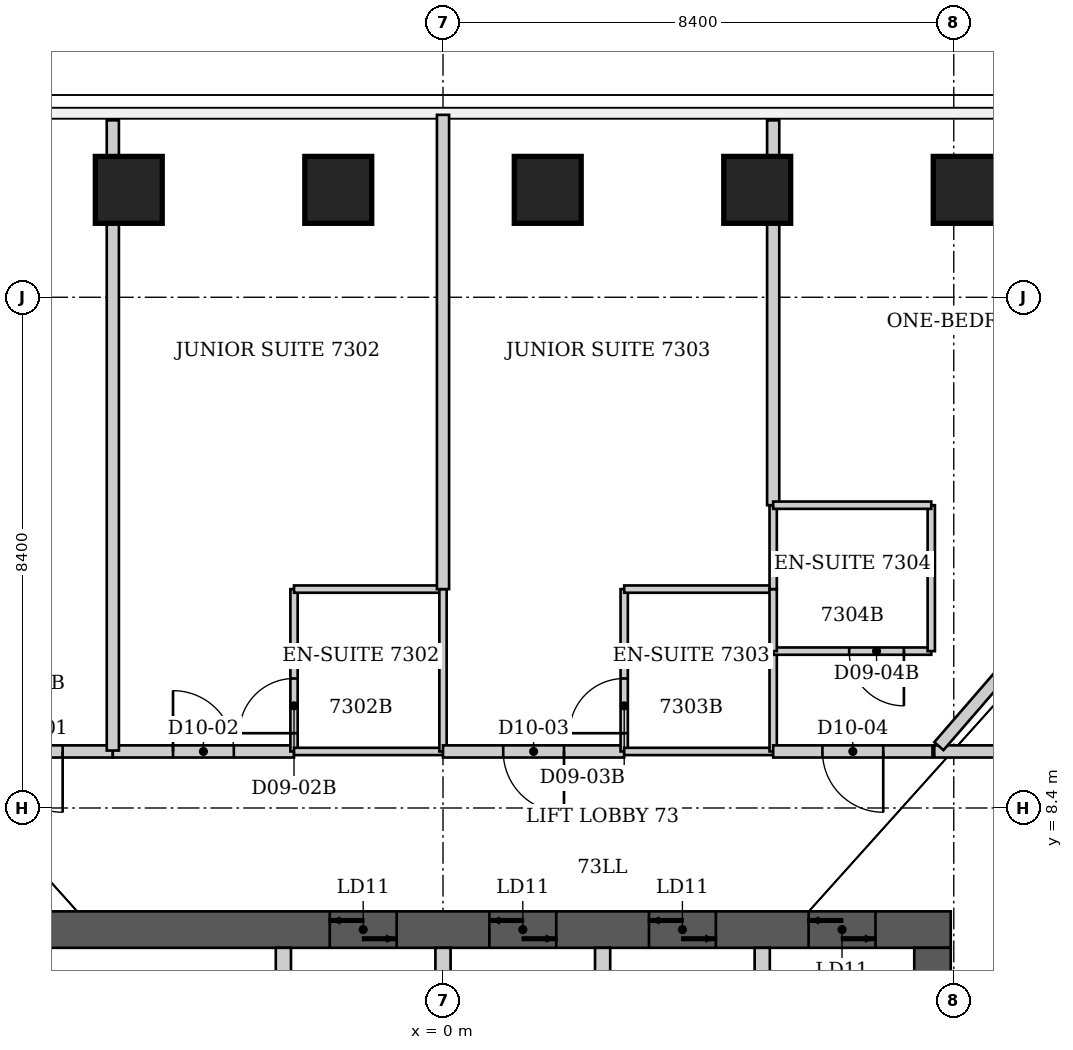
"""IFC4 building model, lengths in metres.
Left out: names, types, materials, properties, quantities, classifications, styles, units other than length and angle.
Written with IfcOpenShell. Run it as: python <this file> out.ifc"""

import sys

from ifc_helpers import new_model, si_unit, direction, frame, frame_2d, origin, origin_2d, place, context, subcontext, project, spatial, rectangle, extrude, element, fill, save


model = new_model("IFC4")
c1 = context("Model", 3, precision=1e-05, world=origin(), true_north=direction((0.0, 1.0)))
c2 = subcontext(c1, "Body", "Model", "MODEL_VIEW")
j1 = project(units=[si_unit("LENGTHUNIT", "METRE"), si_unit("PLANEANGLEUNIT", "RADIAN")], contexts=[c1])
p1 = place(None, origin())
s1 = spatial("IfcSite", under=j1, at=p1, CompositionType="ELEMENT")
p2 = place(p1, origin())
s2 = spatial("IfcBuilding", under=s1, at=p2, CompositionType="ELEMENT")
p3 = place(p2, frame((0.0, 0.0, 291.2)))
s3 = spatial("IfcBuildingStorey", under=s2, at=p3, CompositionType="ELEMENT", Elevation=291.2)
for number, where, z_axis, x_axis in (
    (1, (-5.167, 18.566, 0.0), (0.0, 0.0, 1.0), (0.0, 1.0, 0.0)),
    (2, (-1.722, 18.566, 0.0), (0.0, 0.0, 1.0), (0.0, 1.0, 0.0)),
    (3, (1.722, 18.566, 0.0), (0.0, 0.0, 1.0), (0.0, 1.0, 0.0)),
    (4, (5.167, 18.566, 0.0), (0.0, 0.0, 1.0), (0.0, 1.0, 0.0)),
    (5, (8.613, 18.566, 0.0), (0.0, 0.0, 1.0), (0.0, 1.0, 0.0)),
):
    element("IfcColumn", number, at=place(p3, frame(where, z_axis=z_axis, x_axis=x_axis)), inside=s3, PredefinedType="COLUMN", context=c2, shape_type="SweptSolid", body=[
        extrude(rectangle(XDim=1.1, YDim=1.1, at=origin_2d()), origin(), (0.0, 0.0, 1.0), 3.8),
    ])
p4 = place(p3, frame((-8.35, 6.4, 0.0), z_axis=(0.0, 0.0, 1.0), x_axis=(1.0, 0.0, 0.0)))
e6 = element("IfcWall", 6, at=p4, inside=s3, PredefinedType="SHEAR", context=c2, shape_type="SweptSolid", body=[
    extrude(rectangle(XDim=16.7, YDim=0.6, at=frame_2d((8.35, 0.0))), origin(), (0.0, 0.0, 1.0), 3.8),
])
p5 = place(p4, frame((6.488, 0.0, 0.0)))
e7 = element("IfcOpeningElement", 7, at=p5, cuts=e6, PredefinedType="OPENING", context=c2, shape_type="SweptSolid", body=[
    extrude(rectangle(XDim=1.1, YDim=2.1, at=frame_2d((0.55, 1.05))), frame((0.0, 0.3, 0.0), z_axis=(0.0, -1.0, 0.0), x_axis=(1.0, 0.0, 0.0)), (0.0, 0.0, 1.0), 0.6),
])
p6 = place(p4, frame((9.113, 0.0, 0.0)))
e8 = element("IfcOpeningElement", 8, at=p6, cuts=e6, PredefinedType="OPENING", context=c2, shape_type="SweptSolid", body=[
    extrude(rectangle(XDim=1.1, YDim=2.1, at=frame_2d((0.55, 1.05))), frame((0.0, 0.3, 0.0), z_axis=(0.0, -1.0, 0.0), x_axis=(1.0, 0.0, 0.0)), (0.0, 0.0, 1.0), 0.6),
])
p7 = place(p4, frame((11.738, 0.0, 0.0)))
e9 = element("IfcOpeningElement", 9, at=p7, cuts=e6, PredefinedType="OPENING", context=c2, shape_type="SweptSolid", body=[
    extrude(rectangle(XDim=1.1, YDim=2.1, at=frame_2d((0.55, 1.05))), frame((0.0, 0.3, 0.0), z_axis=(0.0, -1.0, 0.0), x_axis=(1.0, 0.0, 0.0)), (0.0, 0.0, 1.0), 0.6),
])
p8 = place(p4, frame((14.363, 0.0, 0.0)))
e10 = element("IfcOpeningElement", 10, at=p8, cuts=e6, PredefinedType="OPENING", context=c2, shape_type="SweptSolid", body=[
    extrude(rectangle(XDim=1.1, YDim=2.1, at=frame_2d((0.55, 1.05))), frame((0.0, 0.3, 0.0), z_axis=(0.0, -1.0, 0.0), x_axis=(1.0, 0.0, 0.0)), (0.0, 0.0, 1.0), 0.6),
])
p9 = place(p3, frame((8.05, -6.1, 0.0), z_axis=(0.0, 0.0, 1.0), x_axis=(0.0, 1.0, 0.0)))
e11 = element("IfcWall", 11, at=p9, inside=s3, PredefinedType="SHEAR", context=c2, shape_type="SweptSolid", body=[
    extrude(rectangle(XDim=12.2, YDim=0.6, at=frame_2d((6.1, 0.0))), origin(), (0.0, 0.0, 1.0), 3.8),
])
p10 = place(p9, frame((7.6, 0.0, 0.0)))
e12 = element("IfcOpeningElement", 12, at=p10, cuts=e11, PredefinedType="OPENING", context=c2, shape_type="SweptSolid", body=[
    extrude(rectangle(XDim=1.2, YDim=2.2, at=frame_2d((0.6, 1.1))), frame((0.0, 0.3, 0.0), z_axis=(0.0, -1.0, 0.0), x_axis=(1.0, 0.0, 0.0)), (0.0, 0.0, 1.0), 0.6),
])
for number, where, z_axis, x_axis in (
    (13, (-2.625, 3.35, 0.0), (0.0, 0.0, 1.0), (0.0, 1.0, 0.0)),
    (14, (0.0, 3.35, 0.0), (0.0, 0.0, 1.0), (0.0, 1.0, 0.0)),
    (15, (2.625, 3.35, 0.0), (0.0, 0.0, 1.0), (0.0, 1.0, 0.0)),
    (16, (5.25, 3.35, 0.0), (0.0, 0.0, 1.0), (0.0, 1.0, 0.0)),
):
    element("IfcWall", number, at=place(p3, frame(where, z_axis=z_axis, x_axis=x_axis)), inside=s3, PredefinedType="PARTITIONING", context=c2, shape_type="SweptSolid", body=[
        extrude(rectangle(XDim=2.75, YDim=0.25, at=frame_2d((1.375, 0.0))), origin(), (0.0, 0.0, 1.0), 3.8),
    ])
p11 = place(p3, frame((-5.43, 9.33, 0.0), z_axis=(0.0, 0.0, 1.0), x_axis=(-1.0, 0.0, 0.0)))
e17 = element("IfcWall", 17, at=p11, inside=s3, PredefinedType="PARTITIONING", context=c2, shape_type="SweptSolid", body=[
    extrude(rectangle(XDim=2.65, YDim=0.2, at=frame_2d((1.325, 0.0))), origin(), (0.0, 0.0, 1.0), 3.64),
])
p12 = place(p11, frame((0.825, 0.0, 0.0)))
e18 = element("IfcOpeningElement", 18, at=p12, cuts=e17, PredefinedType="OPENING", context=c2, shape_type="SweptSolid", body=[
    extrude(rectangle(XDim=1.0, YDim=2.13, at=frame_2d((0.5, 1.065))), frame((0.0, 0.1, 0.0), z_axis=(0.0, -1.0, 0.0), x_axis=(1.0, 0.0, 0.0)), (0.0, 0.0, 1.0), 0.2),
])
p13 = place(p3, frame((-5.43, 9.33, 0.0), z_axis=(0.0, 0.0, 1.0), x_axis=(1.0, 0.0, 0.0)))
e19 = element("IfcWall", 19, at=p13, inside=s3, PredefinedType="PARTITIONING", context=c2, shape_type="SweptSolid", body=[
    extrude(rectangle(XDim=2.98, YDim=0.2, at=frame_2d((1.49, 0.0))), origin(), (0.0, 0.0, 1.0), 3.64),
])
p14 = place(p13, frame((0.99, 0.0, 0.0)))
e20 = element("IfcOpeningElement", 20, at=p14, cuts=e19, PredefinedType="OPENING", context=c2, shape_type="SweptSolid", body=[
    extrude(rectangle(XDim=1.0, YDim=2.13, at=frame_2d((0.5, 1.065))), frame((0.0, 0.1, 0.0), z_axis=(0.0, -1.0, 0.0), x_axis=(1.0, 0.0, 0.0)), (0.0, 0.0, 1.0), 0.2),
])
p15 = place(p3, frame((-5.43, 19.71, 0.0), z_axis=(0.0, 0.0, 1.0), x_axis=(0.0, -1.0, 0.0)))
e21 = element("IfcWall", 21, at=p15, inside=s3, PredefinedType="PARTITIONING", context=c2, shape_type="SweptSolid", body=[
    extrude(rectangle(XDim=10.365, YDim=0.2, at=frame_2d((5.183, 0.0))), origin(), (0.0, 0.0, 1.0), 3.64),
])
p16 = place(p3, frame((-2.45, 12.0, 0.0), z_axis=(0.0, 0.0, 1.0), x_axis=(0.0, -1.0, 0.0)))
e22 = element("IfcWall", 22, at=p16, inside=s3, PredefinedType="PARTITIONING", context=c2, shape_type="SweptSolid", body=[
    extrude(rectangle(XDim=2.67, YDim=0.12, at=frame_2d((1.335, 0.0))), origin(), (0.0, 0.0, 1.0), 3.64),
])
p17 = place(p16, frame((1.47, 0.0, 0.0)))
e23 = element("IfcOpeningElement", 23, at=p17, cuts=e22, PredefinedType="OPENING", context=c2, shape_type="SweptSolid", body=[
    extrude(rectangle(XDim=0.9, YDim=2.03, at=frame_2d((0.45, 1.015))), frame((0.0, 0.06, 0.0), z_axis=(0.0, -1.0, 0.0), x_axis=(1.0, 0.0, 0.0)), (0.0, 0.0, 1.0), 0.12),
])
for number, where, z_axis, x_axis in (
    (24, (0.0, 9.33, 0.0), (0.0, 0.0, 1.0), (-1.0, 0.0, 0.0)),
    (25, (0.0, 12.0, 0.0), (0.0, 0.0, 1.0), (-1.0, 0.0, 0.0)),
):
    element("IfcWall", number, at=place(p3, frame(where, z_axis=z_axis, x_axis=x_axis)), inside=s3, PredefinedType="PARTITIONING", context=c2, shape_type="SweptSolid", body=[
        extrude(rectangle(XDim=2.45, YDim=0.12, at=frame_2d((1.225, 0.0))), origin(), (0.0, 0.0, 1.0), 3.64),
    ])
p18 = place(p3, frame((0.0, 12.0, 0.0), z_axis=(0.0, 0.0, 1.0), x_axis=(0.0, -1.0, 0.0)))
e26 = element("IfcWall", 26, at=p18, inside=s3, PredefinedType="PARTITIONING", context=c2, shape_type="SweptSolid", body=[
    extrude(rectangle(XDim=2.67, YDim=0.12, at=frame_2d((1.335, 0.0))), origin(), (0.0, 0.0, 1.0), 3.023),
])
p19 = place(p3, frame((0.0, 19.8, 0.0), z_axis=(0.0, 0.0, 1.0), x_axis=(0.0, -1.0, 0.0)))
e27 = element("IfcWall", 27, at=p19, inside=s3, PredefinedType="PARTITIONING", context=c2, shape_type="SweptSolid", body=[
    extrude(rectangle(XDim=7.8, YDim=0.2, at=frame_2d((3.9, 0.0))), origin(), (0.0, 0.0, 1.0), 3.023),
])
p20 = place(p3, frame((2.98, 9.33, 0.0), z_axis=(0.0, 0.0, 1.0), x_axis=(-1.0, 0.0, 0.0)))
e28 = element("IfcWall", 28, at=p20, inside=s3, PredefinedType="PARTITIONING", context=c2, shape_type="SweptSolid", body=[
    extrude(rectangle(XDim=2.98, YDim=0.2, at=frame_2d((1.49, 0.0))), origin(), (0.0, 0.0, 1.0), 3.64),
])
p21 = place(p20, frame((0.99, 0.0, 0.0)))
e29 = element("IfcOpeningElement", 29, at=p21, cuts=e28, PredefinedType="OPENING", context=c2, shape_type="SweptSolid", body=[
    extrude(rectangle(XDim=1.0, YDim=2.13, at=frame_2d((0.5, 1.065))), frame((0.0, 0.1, 0.0), z_axis=(0.0, -1.0, 0.0), x_axis=(1.0, 0.0, 0.0)), (0.0, 0.0, 1.0), 0.2),
])
p22 = place(p3, frame((2.98, 12.0, 0.0), z_axis=(0.0, 0.0, 1.0), x_axis=(0.0, -1.0, 0.0)))
e30 = element("IfcWall", 30, at=p22, inside=s3, PredefinedType="PARTITIONING", context=c2, shape_type="SweptSolid", body=[
    extrude(rectangle(XDim=2.67, YDim=0.12, at=frame_2d((1.335, 0.0))), origin(), (0.0, 0.0, 1.0), 3.64),
])
p23 = place(p22, frame((1.47, 0.0, 0.0)))
e31 = element("IfcOpeningElement", 31, at=p23, cuts=e30, PredefinedType="OPENING", context=c2, shape_type="SweptSolid", body=[
    extrude(rectangle(XDim=0.9, YDim=2.03, at=frame_2d((0.45, 1.015))), frame((0.0, 0.06, 0.0), z_axis=(0.0, -1.0, 0.0), x_axis=(1.0, 0.0, 0.0)), (0.0, 0.0, 1.0), 0.12),
])
p24 = place(p3, frame((5.43, 9.33, 0.0), z_axis=(0.0, 0.0, 1.0), x_axis=(-1.0, 0.0, 0.0)))
e32 = element("IfcWall", 32, at=p24, inside=s3, PredefinedType="PARTITIONING", context=c2, shape_type="SweptSolid", body=[
    extrude(rectangle(XDim=2.45, YDim=0.12, at=frame_2d((1.225, 0.0))), origin(), (0.0, 0.0, 1.0), 3.64),
])
p25 = place(p3, frame((5.43, 10.98, 0.0), z_axis=(0.0, 0.0, 1.0), x_axis=(0.0, -1.0, 0.0)))
e33 = element("IfcWall", 33, at=p25, inside=s3, PredefinedType="PARTITIONING", context=c2, shape_type="SweptSolid", body=[
    extrude(rectangle(XDim=1.65, YDim=0.12, at=frame_2d((0.825, 0.0))), origin(), (0.0, 0.0, 1.0), 3.64),
])
p26 = place(p3, frame((5.43, 10.98, 0.0), z_axis=(0.0, 0.0, 1.0), x_axis=(1.0, 0.0, 0.0)))
e34 = element("IfcWall", 34, at=p26, inside=s3, PredefinedType="PARTITIONING", context=c2, shape_type="SweptSolid", body=[
    extrude(rectangle(XDim=2.6, YDim=0.12, at=frame_2d((1.3, 0.0))), origin(), (0.0, 0.0, 1.0), 3.64),
])
p27 = place(p26, frame((1.25, 0.0, 0.0)))
e35 = element("IfcOpeningElement", 35, at=p27, cuts=e34, PredefinedType="OPENING", context=c2, shape_type="SweptSolid", body=[
    extrude(rectangle(XDim=0.9, YDim=2.03, at=frame_2d((0.45, 1.015))), frame((0.0, 0.06, 0.0), z_axis=(0.0, -1.0, 0.0), x_axis=(1.0, 0.0, 0.0)), (0.0, 0.0, 1.0), 0.12),
])
p28 = place(p3, frame((5.43, 12.0, 0.0), z_axis=(0.0, 0.0, 1.0), x_axis=(-1.0, 0.0, 0.0)))
e36 = element("IfcWall", 36, at=p28, inside=s3, PredefinedType="PARTITIONING", context=c2, shape_type="SweptSolid", body=[
    extrude(rectangle(XDim=2.45, YDim=0.12, at=frame_2d((1.225, 0.0))), origin(), (0.0, 0.0, 1.0), 3.64),
])
p29 = place(p3, frame((5.43, 12.0, 0.0), z_axis=(0.0, 0.0, 1.0), x_axis=(0.0, -1.0, 0.0)))
e37 = element("IfcWall", 37, at=p29, inside=s3, PredefinedType="PARTITIONING", context=c2, shape_type="SweptSolid", body=[
    extrude(rectangle(XDim=1.02, YDim=0.12, at=frame_2d((0.51, 0.0))), origin(), (0.0, 0.0, 1.0), 3.64),
])
p30 = place(p3, frame((5.43, 13.38, 0.0), z_axis=(0.0, 0.0, 1.0), x_axis=(0.0, -1.0, 0.0)))
e38 = element("IfcWall", 38, at=p30, inside=s3, PredefinedType="PARTITIONING", context=c2, shape_type="SweptSolid", body=[
    extrude(rectangle(XDim=1.38, YDim=0.12, at=frame_2d((0.69, 0.0))), origin(), (0.0, 0.0, 1.0), 3.64),
])
p31 = place(p3, frame((5.43, 19.71, 0.0), z_axis=(0.0, 0.0, 1.0), x_axis=(0.0, -1.0, 0.0)))
e39 = element("IfcWall", 39, at=p31, inside=s3, PredefinedType="PARTITIONING", context=c2, shape_type="SweptSolid", body=[
    extrude(rectangle(XDim=6.33, YDim=0.2, at=frame_2d((3.165, 0.0))), origin(), (0.0, 0.0, 1.0), 3.64),
])
p32 = place(p3, frame((8.03, 10.98, 0.0), z_axis=(0.0, 0.0, 1.0), x_axis=(0.0, 1.0, 0.0)))
e40 = element("IfcWall", 40, at=p32, inside=s3, PredefinedType="PARTITIONING", context=c2, shape_type="SweptSolid", body=[
    extrude(rectangle(XDim=2.4, YDim=0.12, at=frame_2d((1.2, 0.0))), origin(), (0.0, 0.0, 1.0), 3.64),
])
p33 = place(p3, frame((8.03, 13.38, 0.0), z_axis=(0.0, 0.0, 1.0), x_axis=(-1.0, 0.0, 0.0)))
e41 = element("IfcWall", 41, at=p33, inside=s3, PredefinedType="PARTITIONING", context=c2, shape_type="SweptSolid", body=[
    extrude(rectangle(XDim=2.6, YDim=0.12, at=frame_2d((1.3, 0.0))), origin(), (0.0, 0.0, 1.0), 3.64),
])
p34 = place(p3, frame((8.05, 9.33, 0.0), z_axis=(0.0, 0.0, 1.0), x_axis=(-1.0, 0.0, 0.0)))
e42 = element("IfcWall", 42, at=p34, inside=s3, PredefinedType="PARTITIONING", context=c2, shape_type="SweptSolid", body=[
    extrude(rectangle(XDim=2.62, YDim=0.2, at=frame_2d((1.31, 0.0))), origin(), (0.0, 0.0, 1.0), 3.64),
])
p35 = place(p34, frame((0.81, 0.0, 0.0)))
e43 = element("IfcOpeningElement", 43, at=p35, cuts=e42, PredefinedType="OPENING", context=c2, shape_type="SweptSolid", body=[
    extrude(rectangle(XDim=1.0, YDim=2.13, at=frame_2d((0.5, 1.065))), frame((0.0, 0.1, 0.0), z_axis=(0.0, -1.0, 0.0), x_axis=(1.0, 0.0, 0.0)), (0.0, 0.0, 1.0), 0.2),
])
p36 = place(p3, frame((11.19, 9.33, 0.0), z_axis=(0.0, 0.0, 1.0), x_axis=(-1.0, 0.0, 0.0)))
e44 = element("IfcWall", 44, at=p36, inside=s3, PredefinedType="PARTITIONING", context=c2, shape_type="SweptSolid", body=[
    extrude(rectangle(XDim=3.11, YDim=0.2, at=frame_2d((1.555, 0.0))), origin(), (0.0, 0.0, 1.0), 3.64),
])
p37 = place(p3, frame((16.89, 19.507, 0.0), z_axis=(0.0, 0.0, 1.0), x_axis=(-0.654509091565, -0.756054131037, 0.0)))
e45 = element("IfcWall", 45, at=p37, inside=s3, PredefinedType="PARTITIONING", context=c2, shape_type="SweptSolid", body=[
    extrude(rectangle(XDim=13.346, YDim=0.2, at=frame_2d((6.673, 0.0))), origin(), (0.0, 0.0, 1.0), 3.64),
])
p38 = place(p12, origin())
e46 = element("IfcDoor", 46, at=p38, inside=s3, OperationType="SINGLE_SWING_LEFT", PredefinedType="DOOR", context=c2, shape_type="SweptSolid", body=[
    extrude(rectangle(XDim=1.0, YDim=2.13, at=frame_2d((0.5, 1.065))), frame((0.0, 0.025, 0.0), z_axis=(0.0, -1.0, 0.0), x_axis=(1.0, 0.0, 0.0)), (0.0, 0.0, 1.0), 0.05),
])
fill(e18, e46)
p39 = place(p14, origin())
e47 = element("IfcDoor", 47, at=p39, inside=s3, OperationType="SINGLE_SWING_LEFT", PredefinedType="DOOR", context=c2, shape_type="SweptSolid", body=[
    extrude(rectangle(XDim=1.0, YDim=2.13, at=frame_2d((0.5, 1.065))), frame((0.0, 0.025, 0.0), z_axis=(0.0, -1.0, 0.0), x_axis=(1.0, 0.0, 0.0)), (0.0, 0.0, 1.0), 0.05),
])
fill(e20, e47)
p40 = place(p17, origin())
e48 = element("IfcDoor", 48, at=p40, inside=s3, OperationType="SINGLE_SWING_RIGHT", PredefinedType="DOOR", context=c2, shape_type="SweptSolid", body=[
    extrude(rectangle(XDim=0.9, YDim=2.03, at=frame_2d((0.45, 1.015))), frame((0.0, 0.025, 0.0), z_axis=(0.0, -1.0, 0.0), x_axis=(1.0, 0.0, 0.0)), (0.0, 0.0, 1.0), 0.05),
])
fill(e23, e48)
p41 = place(p21, origin())
e49 = element("IfcDoor", 49, at=p41, inside=s3, OperationType="SINGLE_SWING_LEFT", PredefinedType="DOOR", context=c2, shape_type="SweptSolid", body=[
    extrude(rectangle(XDim=1.0, YDim=2.13, at=frame_2d((0.5, 1.065))), frame((0.0, 0.025, 0.0), z_axis=(0.0, -1.0, 0.0), x_axis=(1.0, 0.0, 0.0)), (0.0, 0.0, 1.0), 0.05),
])
fill(e29, e49)
p42 = place(p23, origin())
e50 = element("IfcDoor", 50, at=p42, inside=s3, OperationType="SINGLE_SWING_RIGHT", PredefinedType="DOOR", context=c2, shape_type="SweptSolid", body=[
    extrude(rectangle(XDim=0.9, YDim=2.03, at=frame_2d((0.45, 1.015))), frame((0.0, 0.025, 0.0), z_axis=(0.0, -1.0, 0.0), x_axis=(1.0, 0.0, 0.0)), (0.0, 0.0, 1.0), 0.05),
])
fill(e31, e50)
p43 = place(p35, origin())
e51 = element("IfcDoor", 51, at=p43, inside=s3, OperationType="SINGLE_SWING_LEFT", PredefinedType="DOOR", context=c2, shape_type="SweptSolid", body=[
    extrude(rectangle(XDim=1.0, YDim=2.13, at=frame_2d((0.5, 1.065))), frame((0.0, 0.025, 0.0), z_axis=(0.0, -1.0, 0.0), x_axis=(1.0, 0.0, 0.0)), (0.0, 0.0, 1.0), 0.05),
])
fill(e43, e51)
p44 = place(p27, origin())
e52 = element("IfcDoor", 52, at=p44, inside=s3, OperationType="SINGLE_SWING_RIGHT", PredefinedType="DOOR", context=c2, shape_type="SweptSolid", body=[
    extrude(rectangle(XDim=0.9, YDim=2.03, at=frame_2d((0.45, 1.015))), frame((0.0, 0.025, 0.0), z_axis=(0.0, -1.0, 0.0), x_axis=(1.0, 0.0, 0.0)), (0.0, 0.0, 1.0), 0.05),
])
fill(e35, e52)
p45 = place(p5, origin())
e53 = element("IfcDoor", 53, at=p45, inside=s3, OperationType="DOUBLE_DOOR_SLIDING", PredefinedType="DOOR", context=c2, shape_type="SweptSolid", body=[
    extrude(rectangle(XDim=1.1, YDim=2.1, at=frame_2d((0.55, 1.05))), frame((0.0, 0.025, 0.0), z_axis=(0.0, -1.0, 0.0), x_axis=(1.0, 0.0, 0.0)), (0.0, 0.0, 1.0), 0.05),
])
fill(e7, e53)
p46 = place(p6, origin())
e54 = element("IfcDoor", 54, at=p46, inside=s3, OperationType="DOUBLE_DOOR_SLIDING", PredefinedType="DOOR", context=c2, shape_type="SweptSolid", body=[
    extrude(rectangle(XDim=1.1, YDim=2.1, at=frame_2d((0.55, 1.05))), frame((0.0, 0.025, 0.0), z_axis=(0.0, -1.0, 0.0), x_axis=(1.0, 0.0, 0.0)), (0.0, 0.0, 1.0), 0.05),
])
fill(e8, e54)
p47 = place(p7, origin())
e55 = element("IfcDoor", 55, at=p47, inside=s3, OperationType="DOUBLE_DOOR_SLIDING", PredefinedType="DOOR", context=c2, shape_type="SweptSolid", body=[
    extrude(rectangle(XDim=1.1, YDim=2.1, at=frame_2d((0.55, 1.05))), frame((0.0, 0.025, 0.0), z_axis=(0.0, -1.0, 0.0), x_axis=(1.0, 0.0, 0.0)), (0.0, 0.0, 1.0), 0.05),
])
fill(e9, e55)
p48 = place(p8, origin())
e56 = element("IfcDoor", 56, at=p48, inside=s3, OperationType="DOUBLE_DOOR_SLIDING", PredefinedType="DOOR", context=c2, shape_type="SweptSolid", body=[
    extrude(rectangle(XDim=1.1, YDim=2.1, at=frame_2d((0.55, 1.05))), frame((0.0, 0.025, 0.0), z_axis=(0.0, -1.0, 0.0), x_axis=(1.0, 0.0, 0.0)), (0.0, 0.0, 1.0), 0.05),
])
fill(e10, e56)
save(model, sys.argv[1])
